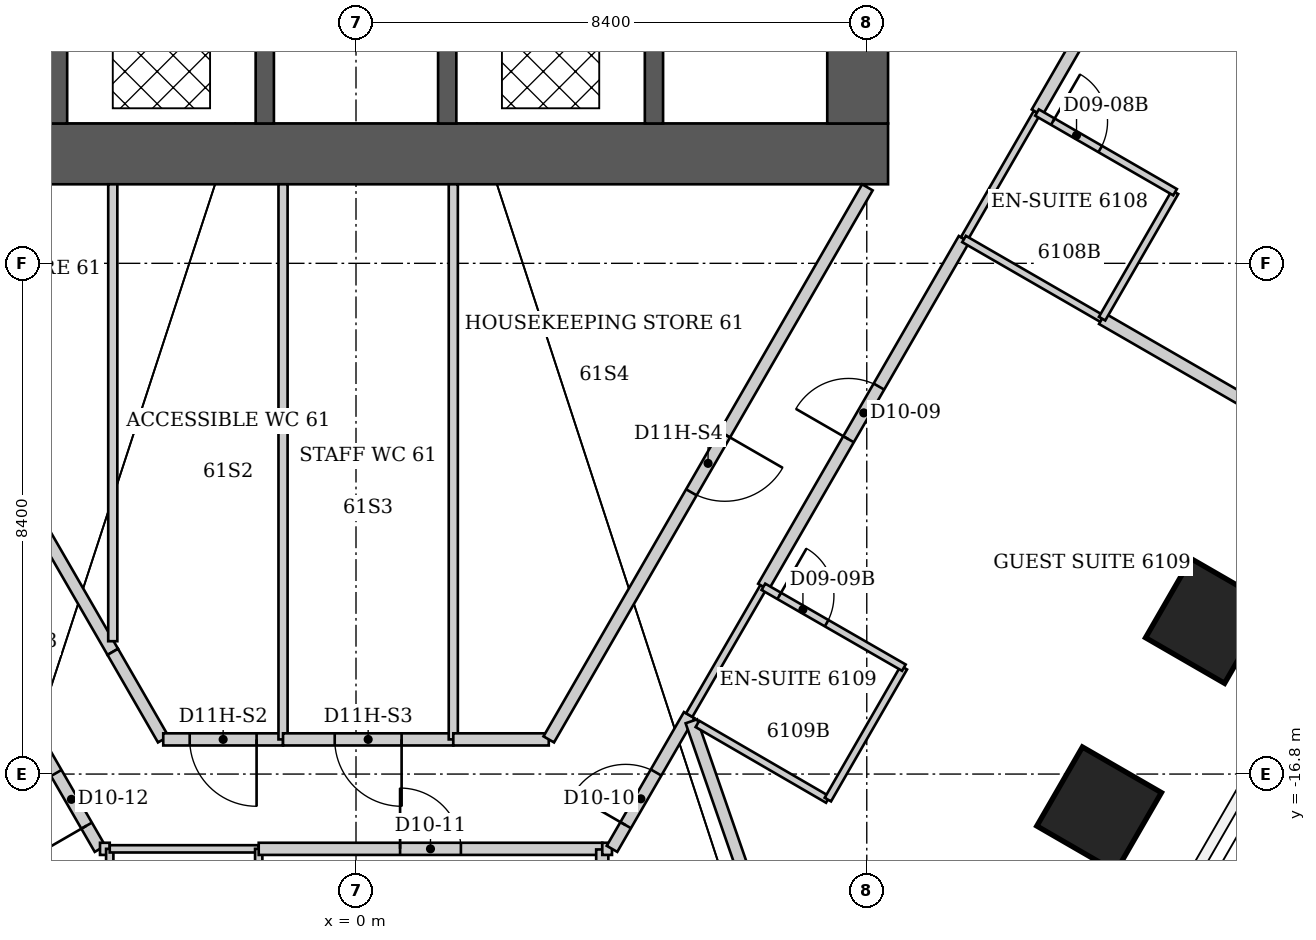
"""IFC4 building model, lengths in metres.
Left out: names, types, materials, properties, quantities, classifications, styles, units other than length and angle.
Written with IfcOpenShell. Run it as: python <this file> out.ifc"""

import sys

from ifc_helpers import new_model, si_unit, direction, frame, frame_2d, origin, origin_2d, place, context, subcontext, project, spatial, rectangle, extrude, element, fill, save


model = new_model("IFC4")
c1 = context("Model", 3, precision=1e-05, world=origin(), true_north=direction((0.0, 1.0)))
c2 = subcontext(c1, "Body", "Model", "MODEL_VIEW")
j1 = project(units=[si_unit("LENGTHUNIT", "METRE"), si_unit("PLANEANGLEUNIT", "RADIAN")], contexts=[c1])
p1 = place(None, origin())
s1 = spatial("IfcSite", under=j1, at=p1, CompositionType="ELEMENT")
p2 = place(p1, origin())
s2 = spatial("IfcBuilding", under=s1, at=p2, CompositionType="ELEMENT")
p3 = place(p2, frame((0.0, 0.0, 244.0)))
s3 = spatial("IfcBuildingStorey", under=s2, at=p3, CompositionType="ELEMENT", Elevation=244.0)
p4 = place(p3, frame((14.01, -14.283, 0.0), z_axis=(-0.039640696707, 0.040474562496, 0.998393922736), x_axis=(0.864775130598, -0.499185180443, 0.054572237685)))
e1 = element("IfcColumn", 1, at=p4, inside=s3, PredefinedType="COLUMN", context=c2, shape_type="SweptSolid", body=[
    extrude(rectangle(XDim=1.5, YDim=1.5, at=origin_2d()), origin(), (0.0, 0.0, 1.0), 3.806),
])
p5 = place(p3, frame((12.221, -17.38, 0.0), z_axis=(-0.03456633886, 0.04918809259, 0.998191214029), x_axis=(0.865277468139, -0.498319705598, 0.054519484068)))
e2 = element("IfcColumn", 2, at=p5, inside=s3, PredefinedType="COLUMN", context=c2, shape_type="SweptSolid", body=[
    extrude(rectangle(XDim=1.5, YDim=1.5, at=origin_2d()), origin(), (0.0, 0.0, 1.0), 3.807),
])
p6 = place(p3, frame((-8.75, -6.6, 0.0), z_axis=(0.0, 0.0, 1.0), x_axis=(1.0, 0.0, 0.0)))
e3 = element("IfcWall", 3, at=p6, inside=s3, PredefinedType="SHEAR", context=c2, shape_type="SweptSolid", body=[
    extrude(rectangle(XDim=17.5, YDim=1.0, at=frame_2d((8.75, 0.0))), origin(), (0.0, 0.0, 1.0), 3.8),
])
p7 = place(p3, frame((8.25, -6.1, 0.0), z_axis=(0.0, 0.0, 1.0), x_axis=(0.0, 1.0, 0.0)))
e4 = element("IfcWall", 4, at=p7, inside=s3, PredefinedType="SHEAR", context=c2, shape_type="SweptSolid", body=[
    extrude(rectangle(XDim=12.2, YDim=1.0, at=frame_2d((6.1, 0.0))), origin(), (0.0, 0.0, 1.0), 3.8),
])
p8 = place(p7, frame((7.6, 0.0, 0.0)))
e5 = element("IfcOpeningElement", 5, at=p8, cuts=e4, PredefinedType="OPENING", context=c2, shape_type="SweptSolid", body=[
    extrude(rectangle(XDim=1.2, YDim=2.2, at=frame_2d((0.6, 1.1))), frame((0.0, 0.5, 0.0), z_axis=(0.0, -1.0, 0.0), x_axis=(1.0, 0.0, 0.0)), (0.0, 0.0, 1.0), 1.0),
])
for number, where, z_axis, x_axis in (
    (6, (-4.9, -6.1, 0.0), (0.0, 0.0, 1.0), (0.0, 1.0, 0.0)),
    (7, (-1.5, -6.1, 0.0), (0.0, 0.0, 1.0), (0.0, 1.0, 0.0)),
    (8, (1.5, -6.1, 0.0), (0.0, 0.0, 1.0), (0.0, 1.0, 0.0)),
    (9, (4.9, -6.1, 0.0), (0.0, 0.0, 1.0), (0.0, 1.0, 0.0)),
):
    element("IfcWall", number, at=place(p3, frame(where, z_axis=z_axis, x_axis=x_axis)), inside=s3, PredefinedType="SHEAR", context=c2, shape_type="SweptSolid", body=[
        extrude(rectangle(XDim=7.2, YDim=0.3, at=frame_2d((3.6, 0.0))), origin(), (0.0, 0.0, 1.0), 3.8),
    ])
p9 = place(p3, frame((-5.48, -15.83, 0.0), z_axis=(0.0, 0.0, 1.0), x_axis=(0.499963722229, -0.866046347752, 0.0)))
e10 = element("IfcWall", 10, at=p9, inside=s3, PredefinedType="PARTITIONING", context=c2, shape_type="SweptSolid", body=[
    extrude(rectangle(XDim=2.54, YDim=0.2, at=frame_2d((1.27, 0.0))), origin(), (0.0, 0.0, 1.0), 3.64),
])
p10 = place(p9, frame((1.1, 0.0, 0.0)))
e11 = element("IfcOpeningElement", 11, at=p10, cuts=e10, PredefinedType="OPENING", context=c2, shape_type="SweptSolid", body=[
    extrude(rectangle(XDim=1.0, YDim=2.13, at=frame_2d((0.5, 1.065))), frame((0.0, 0.1, 0.0), z_axis=(0.0, -1.0, 0.0), x_axis=(1.0, 0.0, 0.0)), (0.0, 0.0, 1.0), 0.2),
])
p11 = place(p3, frame((-4.21, -18.03, 0.0), z_axis=(0.0, 0.0, 1.0), x_axis=(1.0, 0.0, 0.0)))
e12 = element("IfcWall", 12, at=p11, inside=s3, PredefinedType="PARTITIONING", context=c2, shape_type="SweptSolid", body=[
    extrude(rectangle(XDim=0.16, YDim=0.2, at=frame_2d((0.08, 0.0))), origin(), (0.0, 0.0, 1.0), 3.64),
])
p12 = place(p3, frame((-4.05, -20.7, 0.0), z_axis=(0.0, 0.0, 1.0), x_axis=(0.0, 1.0, 0.0)))
e13 = element("IfcWall", 13, at=p12, inside=s3, PredefinedType="PARTITIONING", context=c2, shape_type="SweptSolid", body=[
    extrude(rectangle(XDim=2.67, YDim=0.12, at=frame_2d((1.335, 0.0))), origin(), (0.0, 0.0, 1.0), 3.64),
])
p13 = place(p3, frame((-4.05, -18.03, 0.0), z_axis=(0.0, 0.0, 1.0), x_axis=(1.0, 0.0, 0.0)))
e14 = element("IfcWall", 14, at=p13, inside=s3, PredefinedType="PARTITIONING", context=c2, shape_type="SweptSolid", body=[
    extrude(rectangle(XDim=2.45, YDim=0.12, at=frame_2d((1.225, 0.0))), origin(), (0.0, 0.0, 1.0), 3.64),
])
p14 = place(p3, frame((-4.0, -14.79, 0.0), z_axis=(0.0, 0.0, 1.0), x_axis=(-0.499916512745, 0.866073599808, 0.0)))
e15 = element("IfcWall", 15, at=p14, inside=s3, PredefinedType="PARTITIONING", context=c2, shape_type="SweptSolid", body=[
    extrude(rectangle(XDim=8.821, YDim=0.2, at=frame_2d((4.411, 0.0))), origin(), (0.0, 0.0, 1.0), 3.64),
])
p15 = place(p14, frame((3.861, 0.0, 0.0)))
e16 = element("IfcOpeningElement", 16, at=p15, cuts=e15, PredefinedType="OPENING", context=c2, shape_type="SweptSolid", body=[
    extrude(rectangle(XDim=1.1, YDim=2.2, at=frame_2d((0.55, 1.1))), frame((0.0, 0.1, 0.0), z_axis=(0.0, -1.0, 0.0), x_axis=(1.0, 0.0, 0.0)), (0.0, 0.0, 1.0), 0.2),
])
p16 = place(p3, frame((-4.0, -7.1, 0.0), z_axis=(0.0, 0.0, 1.0), x_axis=(0.0, -1.0, 0.0)))
e17 = element("IfcWall", 17, at=p16, inside=s3, PredefinedType="PARTITIONING", context=c2, shape_type="SweptSolid", body=[
    extrude(rectangle(XDim=7.515, YDim=0.15, at=frame_2d((3.757, 0.0))), origin(), (0.0, 0.0, 1.0), 3.64),
])
p17 = place(p3, frame((-3.17, -16.23, 0.0), z_axis=(0.0, 0.0, 1.0), x_axis=(-0.499425709803, 0.866356716594, 0.0)))
e18 = element("IfcWall", 18, at=p17, inside=s3, PredefinedType="PARTITIONING", context=c2, shape_type="SweptSolid", body=[
    extrude(rectangle(XDim=1.662, YDim=0.2, at=frame_2d((0.831, 0.0))), origin(), (0.0, 0.0, 1.0), 3.64),
])
p18 = place(p3, frame((-1.6, -20.7, 0.0), z_axis=(0.0, 0.0, 1.0), x_axis=(0.0, 1.0, 0.0)))
e19 = element("IfcWall", 19, at=p18, inside=s3, PredefinedType="PARTITIONING", context=c2, shape_type="SweptSolid", body=[
    extrude(rectangle(XDim=2.67, YDim=0.12, at=frame_2d((1.335, 0.0))), origin(), (0.0, 0.0, 1.0), 3.64),
])
p19 = place(p18, frame((1.47, 0.0, 0.0)))
e20 = element("IfcOpeningElement", 20, at=p19, cuts=e19, PredefinedType="OPENING", context=c2, shape_type="SweptSolid", body=[
    extrude(rectangle(XDim=0.9, YDim=2.03, at=frame_2d((0.45, 1.015))), frame((0.0, 0.06, 0.0), z_axis=(0.0, -1.0, 0.0), x_axis=(1.0, 0.0, 0.0)), (0.0, 0.0, 1.0), 0.12),
])
p20 = place(p3, frame((-1.6, -18.03, 0.0), z_axis=(0.0, 0.0, 1.0), x_axis=(1.0, 0.0, 0.0)))
e21 = element("IfcWall", 21, at=p20, inside=s3, PredefinedType="PARTITIONING", context=c2, shape_type="SweptSolid", body=[
    extrude(rectangle(XDim=5.65, YDim=0.2, at=frame_2d((2.825, 0.0))), origin(), (0.0, 0.0, 1.0), 3.64),
])
p21 = place(p20, frame((2.325, 0.0, 0.0)))
e22 = element("IfcOpeningElement", 22, at=p21, cuts=e21, PredefinedType="OPENING", context=c2, shape_type="SweptSolid", body=[
    extrude(rectangle(XDim=1.0, YDim=2.13, at=frame_2d((0.5, 1.065))), frame((0.0, 0.1, 0.0), z_axis=(0.0, -1.0, 0.0), x_axis=(1.0, 0.0, 0.0)), (0.0, 0.0, 1.0), 0.2),
])
p22 = place(p3, frame((-1.2, -16.23, 0.0), z_axis=(0.0, 0.0, 1.0), x_axis=(-1.0, 0.0, 0.0)))
e23 = element("IfcWall", 23, at=p22, inside=s3, PredefinedType="PARTITIONING", context=c2, shape_type="SweptSolid", body=[
    extrude(rectangle(XDim=1.97, YDim=0.2, at=frame_2d((0.985, 0.0))), origin(), (0.0, 0.0, 1.0), 3.64),
])
p23 = place(p22, frame((0.435, 0.0, 0.0)))
e24 = element("IfcOpeningElement", 24, at=p23, cuts=e23, PredefinedType="OPENING", context=c2, shape_type="SweptSolid", body=[
    extrude(rectangle(XDim=1.1, YDim=2.2, at=frame_2d((0.55, 1.1))), frame((0.0, 0.1, 0.0), z_axis=(0.0, -1.0, 0.0), x_axis=(1.0, 0.0, 0.0)), (0.0, 0.0, 1.0), 0.2),
])
p24 = place(p3, frame((-1.2, -7.1, 0.0), z_axis=(0.0, 0.0, 1.0), x_axis=(0.0, -1.0, 0.0)))
e25 = element("IfcWall", 25, at=p24, inside=s3, PredefinedType="PARTITIONING", context=c2, shape_type="SweptSolid", body=[
    extrude(rectangle(XDim=9.13, YDim=0.15, at=frame_2d((4.565, 0.0))), origin(), (0.0, 0.0, 1.0), 3.64),
])
p25 = place(p3, frame((1.6, -16.23, 0.0), z_axis=(0.0, 0.0, 1.0), x_axis=(-1.0, 0.0, 0.0)))
e26 = element("IfcWall", 26, at=p25, inside=s3, PredefinedType="PARTITIONING", context=c2, shape_type="SweptSolid", body=[
    extrude(rectangle(XDim=2.8, YDim=0.2, at=frame_2d((1.4, 0.0))), origin(), (0.0, 0.0, 1.0), 3.64),
])
p26 = place(p25, frame((0.85, 0.0, 0.0)))
e27 = element("IfcOpeningElement", 27, at=p26, cuts=e26, PredefinedType="OPENING", context=c2, shape_type="SweptSolid", body=[
    extrude(rectangle(XDim=1.1, YDim=2.2, at=frame_2d((0.55, 1.1))), frame((0.0, 0.1, 0.0), z_axis=(0.0, -1.0, 0.0), x_axis=(1.0, 0.0, 0.0)), (0.0, 0.0, 1.0), 0.2),
])
p27 = place(p3, frame((1.6, -7.1, 0.0), z_axis=(0.0, 0.0, 1.0), x_axis=(0.0, -1.0, 0.0)))
e28 = element("IfcWall", 28, at=p27, inside=s3, PredefinedType="PARTITIONING", context=c2, shape_type="SweptSolid", body=[
    extrude(rectangle(XDim=9.13, YDim=0.15, at=frame_2d((4.565, 0.0))), origin(), (0.0, 0.0, 1.0), 3.64),
])
p28 = place(p3, frame((3.17, -16.23, 0.0), z_axis=(0.0, 0.0, 1.0), x_axis=(-1.0, 0.0, 0.0)))
e29 = element("IfcWall", 29, at=p28, inside=s3, PredefinedType="PARTITIONING", context=c2, shape_type="SweptSolid", body=[
    extrude(rectangle(XDim=1.57, YDim=0.2, at=frame_2d((0.785, 0.0))), origin(), (0.0, 0.0, 1.0), 3.64),
])
p29 = place(p3, frame((4.05, -21.87, 0.0), z_axis=(0.0, 0.0, 1.0), x_axis=(0.0, 1.0, 0.0)))
e30 = element("IfcWall", 30, at=p29, inside=s3, PredefinedType="PARTITIONING", context=c2, shape_type="SweptSolid", body=[
    extrude(rectangle(XDim=3.83, YDim=0.2, at=frame_2d((1.915, 0.0))), origin(), (0.0, 0.0, 1.0), 3.64),
])
p30 = place(p3, frame((4.05, -18.03, 0.0), z_axis=(0.0, 0.0, 1.0), x_axis=(1.0, 0.0, 0.0)))
e31 = element("IfcWall", 31, at=p30, inside=s3, PredefinedType="PARTITIONING", context=c2, shape_type="SweptSolid", body=[
    extrude(rectangle(XDim=0.16, YDim=0.2, at=frame_2d((0.08, 0.0))), origin(), (0.0, 0.0, 1.0), 3.64),
])
p31 = place(p3, frame((4.21, -18.03, 0.0), z_axis=(0.0, 0.0, 1.0), x_axis=(0.499963722229, 0.866046347752, 0.0)))
e32 = element("IfcWall", 32, at=p31, inside=s3, PredefinedType="PARTITIONING", context=c2, shape_type="SweptSolid", body=[
    extrude(rectangle(XDim=2.54, YDim=0.2, at=frame_2d((1.27, 0.0))), origin(), (0.0, 0.0, 1.0), 3.64),
])
p32 = place(p31, frame((0.45, 0.0, 0.0)))
e33 = element("IfcOpeningElement", 33, at=p32, cuts=e32, PredefinedType="OPENING", context=c2, shape_type="SweptSolid", body=[
    extrude(rectangle(XDim=1.0, YDim=2.13, at=frame_2d((0.5, 1.065))), frame((0.0, 0.1, 0.0), z_axis=(0.0, -1.0, 0.0), x_axis=(1.0, 0.0, 0.0)), (0.0, 0.0, 1.0), 0.2),
])
p33 = place(p3, frame((5.48, -15.83, 0.0), z_axis=(0.0, 0.0, 1.0), x_axis=(0.501296828005, 0.865275384044, 0.0)))
e34 = element("IfcWall", 34, at=p33, inside=s3, PredefinedType="PARTITIONING", context=c2, shape_type="SweptSolid", body=[
    extrude(rectangle(XDim=2.438, YDim=0.12, at=frame_2d((1.219, 0.0))), origin(), (0.0, 0.0, 1.0), 3.64),
])
p34 = place(p3, frame((5.515, -15.932, 0.0), z_axis=(0.0, 0.0, 1.0), x_axis=(0.327594697431, -0.944818349851, 0.0)))
e35 = element("IfcWall", 35, at=p34, inside=s3, PredefinedType="PARTITIONING", context=c2, shape_type="SweptSolid", body=[
    extrude(rectangle(XDim=10.668, YDim=0.2, at=frame_2d((5.334, 0.0))), origin(), (0.0, 0.0, 1.0), 3.64),
])
p35 = place(p3, frame((5.615, -15.975, 0.0), z_axis=(0.0, 0.0, 1.0), x_axis=(0.864873056518, -0.501990633487, 0.0)))
e36 = element("IfcWall", 36, at=p35, inside=s3, PredefinedType="PARTITIONING", context=c2, shape_type="SweptSolid", body=[
    extrude(rectangle(XDim=2.48, YDim=0.12, at=frame_2d((1.24, 0.0))), origin(), (0.0, 0.0, 1.0), 3.64),
])
p36 = place(p3, frame((6.7, -13.72, 0.0), z_axis=(0.0, 0.0, 1.0), x_axis=(0.499729921425, 0.866181277581, 0.0)))
e37 = element("IfcWall", 37, at=p36, inside=s3, PredefinedType="PARTITIONING", context=c2, shape_type="SweptSolid", body=[
    extrude(rectangle(XDim=6.604, YDim=0.2, at=frame_2d((3.302, 0.0))), origin(), (0.0, 0.0, 1.0), 3.64),
])
p37 = place(p36, frame((2.802, 0.0, 0.0)))
e38 = element("IfcOpeningElement", 38, at=p37, cuts=e37, PredefinedType="OPENING", context=c2, shape_type="SweptSolid", body=[
    extrude(rectangle(XDim=1.0, YDim=2.13, at=frame_2d((0.5, 1.065))), frame((0.0, 0.1, 0.0), z_axis=(0.0, -1.0, 0.0), x_axis=(1.0, 0.0, 0.0)), (0.0, 0.0, 1.0), 0.2),
])
p38 = place(p3, frame((7.76, -17.22, 0.0), z_axis=(0.0, 0.0, 1.0), x_axis=(0.499159685399, 0.866510016372, 0.0)))
e39 = element("IfcWall", 39, at=p38, inside=s3, PredefinedType="PARTITIONING", context=c2, shape_type="SweptSolid", body=[
    extrude(rectangle(XDim=2.504, YDim=0.12, at=frame_2d((1.252, 0.0))), origin(), (0.0, 0.0, 1.0), 3.64),
])
p39 = place(p3, frame((8.41, -7.15, 0.0), z_axis=(0.0, 0.0, 1.0), x_axis=(-0.499828628176, -0.866124322748, 0.0)))
e40 = element("IfcWall", 40, at=p39, inside=s3, PredefinedType="PARTITIONING", context=c2, shape_type="SweptSolid", body=[
    extrude(rectangle(XDim=10.484, YDim=0.2, at=frame_2d((5.242, 0.0))), origin(), (0.0, 0.0, 1.0), 3.64),
])
p40 = place(p39, frame((4.692, 0.0, 0.0)))
e41 = element("IfcOpeningElement", 41, at=p40, cuts=e40, PredefinedType="OPENING", context=c2, shape_type="SweptSolid", body=[
    extrude(rectangle(XDim=1.1, YDim=2.2, at=frame_2d((0.55, 1.1))), frame((0.0, 0.1, 0.0), z_axis=(0.0, -1.0, 0.0), x_axis=(1.0, 0.0, 0.0)), (0.0, 0.0, 1.0), 0.2),
])
p41 = place(p3, frame((9.01, -15.05, 0.0), z_axis=(0.0, 0.0, 1.0), x_axis=(-0.866615255992, 0.498976951453, 0.0)))
e42 = element("IfcWall", 42, at=p41, inside=s3, PredefinedType="PARTITIONING", context=c2, shape_type="SweptSolid", body=[
    extrude(rectangle(XDim=2.666, YDim=0.12, at=frame_2d((1.333, 0.0))), origin(), (0.0, 0.0, 1.0), 3.64),
])
p42 = place(p41, frame((1.466, 0.0, 0.0)))
e43 = element("IfcOpeningElement", 43, at=p42, cuts=e42, PredefinedType="OPENING", context=c2, shape_type="SweptSolid", body=[
    extrude(rectangle(XDim=0.9, YDim=2.03, at=frame_2d((0.45, 1.015))), frame((0.0, 0.06, 0.0), z_axis=(0.0, -1.0, 0.0), x_axis=(1.0, 0.0, 0.0)), (0.0, 0.0, 1.0), 0.12),
])
p43 = place(p3, frame((10.0, -8.0, 0.0), z_axis=(0.0, 0.0, 1.0), x_axis=(0.499693115345, 0.866202511239, 0.0)))
e44 = element("IfcWall", 44, at=p43, inside=s3, PredefinedType="PARTITIONING", context=c2, shape_type="SweptSolid", body=[
    extrude(rectangle(XDim=2.401, YDim=0.12, at=frame_2d((1.201, 0.0))), origin(), (0.0, 0.0, 1.0), 3.64),
])
p44 = place(p3, frame((10.0, -8.0, 0.0), z_axis=(0.0, 0.0, 1.0), x_axis=(0.866010296064, -0.500026166427, 0.0)))
e45 = element("IfcWall", 45, at=p44, inside=s3, PredefinedType="PARTITIONING", context=c2, shape_type="SweptSolid", body=[
    extrude(rectangle(XDim=2.621, YDim=0.12, at=frame_2d((1.311, 0.0))), origin(), (0.0, 0.0, 1.0), 3.64),
])
p45 = place(p3, frame((11.2, -5.92, 0.0), z_axis=(0.0, 0.0, 1.0), x_axis=(0.499809814479, 0.866135179606, 0.0)))
e46 = element("IfcWall", 46, at=p45, inside=s3, PredefinedType="PARTITIONING", context=c2, shape_type="SweptSolid", body=[
    extrude(rectangle(XDim=5.322, YDim=0.2, at=frame_2d((2.661, 0.0))), origin(), (0.0, 0.0, 1.0), 3.64),
])
p46 = place(p45, frame((2.161, 0.0, 0.0)))
e47 = element("IfcOpeningElement", 47, at=p46, cuts=e46, PredefinedType="OPENING", context=c2, shape_type="SweptSolid", body=[
    extrude(rectangle(XDim=1.0, YDim=2.13, at=frame_2d((0.5, 1.065))), frame((0.0, 0.1, 0.0), z_axis=(0.0, -1.0, 0.0), x_axis=(1.0, 0.0, 0.0)), (0.0, 0.0, 1.0), 0.2),
])
p47 = place(p3, frame((12.27, -9.311, 0.0), z_axis=(0.0, 0.0, 1.0), x_axis=(0.865985044037, -0.500069898618, 0.0)))
e48 = element("IfcWall", 48, at=p47, inside=s3, PredefinedType="PARTITIONING", context=c2, shape_type="SweptSolid", body=[
    extrude(rectangle(XDim=5.758, YDim=0.2, at=frame_2d((2.879, 0.0))), origin(), (0.0, 0.0, 1.0), 3.64),
])
p48 = place(p3, frame((12.27, -9.31, 0.0), z_axis=(0.0, 0.0, 1.0), x_axis=(0.499693115345, 0.866202511239, 0.0)))
e49 = element("IfcWall", 49, at=p48, inside=s3, PredefinedType="PARTITIONING", context=c2, shape_type="SweptSolid", body=[
    extrude(rectangle(XDim=2.401, YDim=0.12, at=frame_2d((1.201, 0.0))), origin(), (0.0, 0.0, 1.0), 3.64),
])
p49 = place(p3, frame((13.47, -7.23, 0.0), z_axis=(0.0, 0.0, 1.0), x_axis=(-0.866114241029, 0.499846097802, 0.0)))
e50 = element("IfcWall", 50, at=p49, inside=s3, PredefinedType="PARTITIONING", context=c2, shape_type="SweptSolid", body=[
    extrude(rectangle(XDim=2.621, YDim=0.12, at=frame_2d((1.311, 0.0))), origin(), (0.0, 0.0, 1.0), 3.64),
])
p50 = place(p49, frame((1.421, 0.0, 0.0)))
e51 = element("IfcOpeningElement", 51, at=p50, cuts=e50, PredefinedType="OPENING", context=c2, shape_type="SweptSolid", body=[
    extrude(rectangle(XDim=0.9, YDim=2.03, at=frame_2d((0.45, 1.015))), frame((0.0, 0.06, 0.0), z_axis=(0.0, -1.0, 0.0), x_axis=(1.0, 0.0, 0.0)), (0.0, 0.0, 1.0), 0.12),
])
p51 = place(p50, origin())
e52 = element("IfcDoor", 52, at=p51, inside=s3, OperationType="SINGLE_SWING_RIGHT", PredefinedType="DOOR", context=c2, shape_type="SweptSolid", body=[
    extrude(rectangle(XDim=0.9, YDim=2.03, at=frame_2d((0.45, 1.015))), frame((0.0, 0.025, 0.0), z_axis=(0.0, -1.0, 0.0), x_axis=(1.0, 0.0, 0.0)), (0.0, 0.0, 1.0), 0.05),
])
fill(e51, e52)
p52 = place(p37, origin())
e53 = element("IfcDoor", 53, at=p52, inside=s3, OperationType="SINGLE_SWING_LEFT", PredefinedType="DOOR", context=c2, shape_type="SweptSolid", body=[
    extrude(rectangle(XDim=1.0, YDim=2.13, at=frame_2d((0.5, 1.065))), frame((0.0, 0.025, 0.0), z_axis=(0.0, -1.0, 0.0), x_axis=(1.0, 0.0, 0.0)), (0.0, 0.0, 1.0), 0.05),
])
fill(e38, e53)
p53 = place(p42, origin())
e54 = element("IfcDoor", 54, at=p53, inside=s3, OperationType="SINGLE_SWING_RIGHT", PredefinedType="DOOR", context=c2, shape_type="SweptSolid", body=[
    extrude(rectangle(XDim=0.9, YDim=2.03, at=frame_2d((0.45, 1.015))), frame((0.0, 0.025, 0.0), z_axis=(0.0, -1.0, 0.0), x_axis=(1.0, 0.0, 0.0)), (0.0, 0.0, 1.0), 0.05),
])
fill(e43, e54)
p54 = place(p32, origin())
e55 = element("IfcDoor", 55, at=p54, inside=s3, OperationType="SINGLE_SWING_LEFT", PredefinedType="DOOR", context=c2, shape_type="SweptSolid", body=[
    extrude(rectangle(XDim=1.0, YDim=2.13, at=frame_2d((0.5, 1.065))), frame((0.0, 0.025, 0.0), z_axis=(0.0, -1.0, 0.0), x_axis=(1.0, 0.0, 0.0)), (0.0, 0.0, 1.0), 0.05),
])
fill(e33, e55)
p55 = place(p21, origin())
e56 = element("IfcDoor", 56, at=p55, inside=s3, OperationType="SINGLE_SWING_LEFT", PredefinedType="DOOR", context=c2, shape_type="SweptSolid", body=[
    extrude(rectangle(XDim=1.0, YDim=2.13, at=frame_2d((0.5, 1.065))), frame((0.0, 0.025, 0.0), z_axis=(0.0, -1.0, 0.0), x_axis=(1.0, 0.0, 0.0)), (0.0, 0.0, 1.0), 0.05),
])
fill(e22, e56)
p56 = place(p10, origin())
e57 = element("IfcDoor", 57, at=p56, inside=s3, OperationType="SINGLE_SWING_RIGHT", PredefinedType="DOOR", context=c2, shape_type="SweptSolid", body=[
    extrude(rectangle(XDim=1.0, YDim=2.13, at=frame_2d((0.5, 1.065))), frame((0.0, 0.025, 0.0), z_axis=(0.0, -1.0, 0.0), x_axis=(1.0, 0.0, 0.0)), (0.0, 0.0, 1.0), 0.05),
])
fill(e11, e57)
p57 = place(p23, origin())
e58 = element("IfcDoor", 58, at=p57, inside=s3, OperationType="SINGLE_SWING_LEFT", PredefinedType="DOOR", context=c2, shape_type="SweptSolid", body=[
    extrude(rectangle(XDim=1.1, YDim=2.2, at=frame_2d((0.55, 1.1))), frame((0.0, 0.025, 0.0), z_axis=(0.0, -1.0, 0.0), x_axis=(1.0, 0.0, 0.0)), (0.0, 0.0, 1.0), 0.05),
])
fill(e24, e58)
p58 = place(p26, origin())
e59 = element("IfcDoor", 59, at=p58, inside=s3, OperationType="SINGLE_SWING_LEFT", PredefinedType="DOOR", context=c2, shape_type="SweptSolid", body=[
    extrude(rectangle(XDim=1.1, YDim=2.2, at=frame_2d((0.55, 1.1))), frame((0.0, 0.025, 0.0), z_axis=(0.0, -1.0, 0.0), x_axis=(1.0, 0.0, 0.0)), (0.0, 0.0, 1.0), 0.05),
])
fill(e27, e59)
p59 = place(p40, origin())
e60 = element("IfcDoor", 60, at=p59, inside=s3, OperationType="SINGLE_SWING_LEFT", PredefinedType="DOOR", context=c2, shape_type="SweptSolid", body=[
    extrude(rectangle(XDim=1.1, YDim=2.2, at=frame_2d((0.55, 1.1))), frame((0.0, 0.025, 0.0), z_axis=(0.0, -1.0, 0.0), x_axis=(1.0, 0.0, 0.0)), (0.0, 0.0, 1.0), 0.05),
])
fill(e41, e60)
save(model, sys.argv[1])
